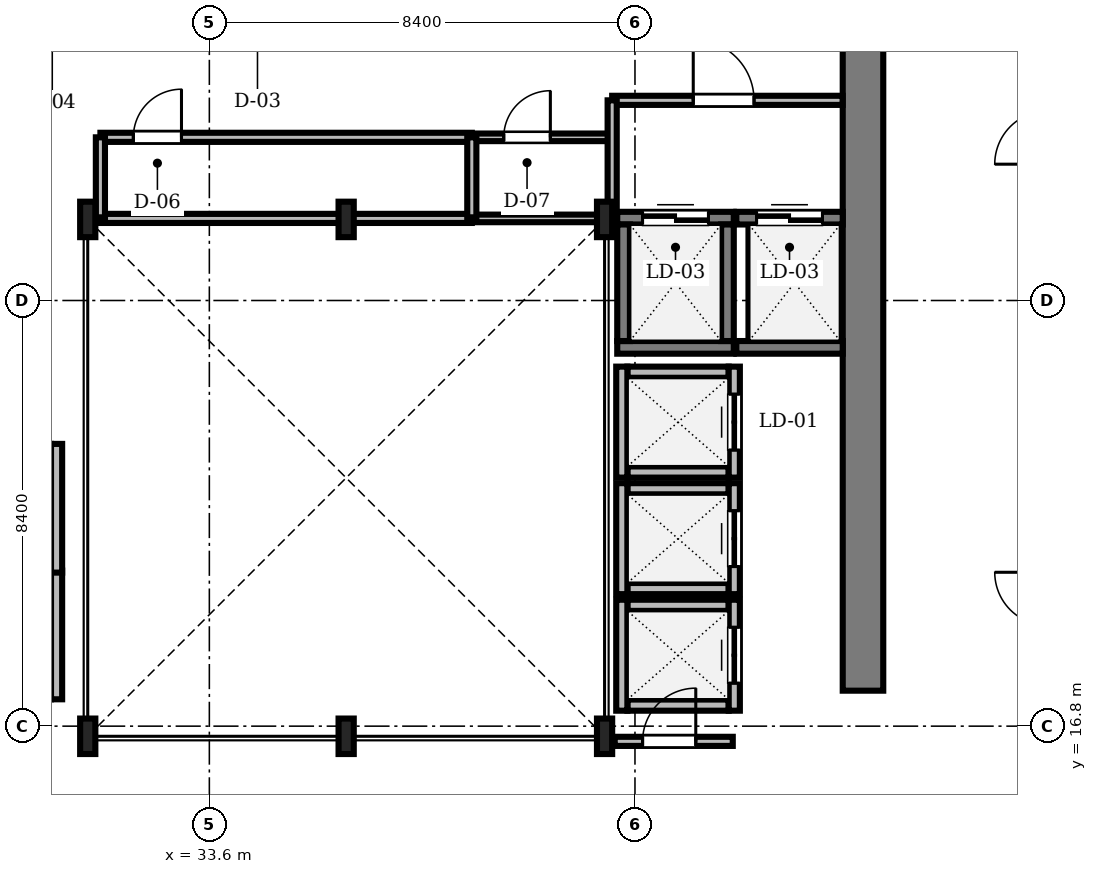
"""IFC4 building model, lengths in metres.
Left out: names, types, materials, properties, quantities, classifications, styles, units other than length and angle.
Written with IfcOpenShell. Run it as: python <this file> out.ifc"""

import sys

from ifc_helpers import new_model, si_unit, direction, frame, frame_2d, origin, origin_2d, place, context, subcontext, project, spatial, rectangle, i_section, extrude, source, transform, mapped, element, fill, save


model = new_model("IFC4")
c1 = context("Model", 3, precision=1e-05, world=origin(), true_north=direction((0.0, 1.0)))
c2 = subcontext(c1, "Body", "Model", "MODEL_VIEW")
j1 = project(units=[si_unit("LENGTHUNIT", "METRE"), si_unit("PLANEANGLEUNIT", "RADIAN")], contexts=[c1])
p1 = place(None, origin())
s1 = spatial("IfcSite", under=j1, at=p1, CompositionType="ELEMENT")
p2 = place(p1, origin())
s2 = spatial("IfcBuilding", under=s1, at=p2, CompositionType="ELEMENT")
p3 = place(p2, frame((0.0, 0.0, 188.55)))
s3 = spatial("IfcBuildingStorey", under=s2, at=p3, CompositionType="ELEMENT", Elevation=188.55)
m1 = source(origin(), c2, "Body", "SweptSolid", [
    extrude(rectangle(XDim=13.15, YDim=0.8, at=frame_2d((6.575, 0.0))), origin(), (0.0, 0.0, 1.0), 3.53),
])
p4 = place(p3, frame((46.5, 17.5, 0.0), z_axis=(0.0, 0.0, 1.0), x_axis=(0.0, 1.0, 0.0)))
e1 = element("IfcWall", 1, at=p4, inside=s3, PredefinedType="SHEAR", context=c2, shape_type="MappedRepresentation", body=[
    mapped(m1, transform((0.0, 0.0, 0.0), scale=1.0)),
])
m2 = source(origin(), c2, "Body", "SweptSolid", [
    extrude(i_section(OverallWidth=0.3, OverallDepth=0.7, WebThickness=0.017, FlangeThickness=0.032, FilletRadius=0.027, at=origin_2d()), origin(), (0.0, 0.0, 1.0), 3.53),
])
for number, where, z_axis, x_axis in (
    (2, (31.2, 16.6, 0.0), (0.0, 0.0, 1.0), (1.0, 0.0, 0.0)),
    (3, (36.3, 16.6, 0.0), (0.0, 0.0, 1.0), (1.0, 0.0, 0.0)),
    (4, (41.4, 16.6, 0.0), (0.0, 0.0, 1.0), (1.0, 0.0, 0.0)),
    (5, (41.4, 26.8, 0.0), (0.0, 0.0, 1.0), (1.0, 0.0, 0.0)),
    (6, (36.3, 26.8, 0.0), (0.0, 0.0, 1.0), (1.0, 0.0, 0.0)),
    (7, (31.2, 26.8, 0.0), (0.0, 0.0, 1.0), (1.0, 0.0, 0.0)),
):
    element("IfcColumn", number, at=place(p3, frame(where, z_axis=z_axis, x_axis=x_axis)), inside=s3, PredefinedType="COLUMN", context=c2, shape_type="MappedRepresentation", body=[
        mapped(m2, transform((0.0, 0.0, 0.0), scale=1.0)),
    ])
m3 = source(origin(), c2, "Body", "SweptSolid", [
    extrude(rectangle(XDim=2.0, YDim=0.22, at=frame_2d((1.0, 0.0))), origin(), (0.0, 0.0, 1.0), 3.53),
])
for number, where, z_axis, x_axis in (
    (8, (41.85, 21.815, 0.0), (0.0, 0.0, 1.0), (1.0, 0.0, 0.0)),
    (9, (41.85, 23.785, 0.0), (0.0, 0.0, 1.0), (1.0, 0.0, 0.0)),
):
    element("IfcWall", number, at=place(p3, frame(where, z_axis=z_axis, x_axis=x_axis)), inside=s3, PredefinedType="SOLIDWALL", context=c2, shape_type="MappedRepresentation", body=[
        mapped(m3, transform((0.0, 0.0, 0.0), scale=1.0)),
    ])
m4 = source(origin(), c2, "Body", "SweptSolid", [
    extrude(rectangle(XDim=2.19, YDim=0.22, at=frame_2d((1.095, 0.0))), origin(), (0.0, 0.0, 1.0), 3.53),
])
p5 = place(p3, frame((41.74, 21.705, 0.0), z_axis=(0.0, 0.0, 1.0), x_axis=(0.0, 1.0, 0.0)))
e10 = element("IfcWall", 10, at=p5, inside=s3, PredefinedType="SOLIDWALL", context=c2, shape_type="MappedRepresentation", body=[
    mapped(m4, transform((0.0, 0.0, 0.0), scale=1.0)),
])
p6 = place(p3, frame((43.96, 21.705, 0.0), z_axis=(0.0, 0.0, 1.0), x_axis=(0.0, 1.0, 0.0)))
e11 = element("IfcWall", 11, at=p6, inside=s3, PredefinedType="SOLIDWALL", context=c2, shape_type="MappedRepresentation", body=[
    mapped(m4, transform((0.0, 0.0, 0.0), scale=1.0)),
])
m5 = source(origin(), c2, "Body", "SweptSolid", [
    extrude(rectangle(XDim=1.1, YDim=2.2, at=frame_2d((0.55, 1.1))), frame((0.0, 0.12, 0.0), z_axis=(0.0, -1.0, 0.0), x_axis=(1.0, 0.0, 0.0)), (0.0, 0.0, 1.0), 0.24),
])
p7 = place(p6, frame((0.545, 0.0, 0.0)))
e12 = element("IfcOpeningElement", 12, at=p7, cuts=e11, PredefinedType="OPENING", context=c2, shape_type="MappedRepresentation", body=[
    mapped(m5, transform((0.0, 0.0, 0.0), scale=1.0)),
])
for number, where, z_axis, x_axis in (
    (13, (41.85, 19.515, 0.0), (0.0, 0.0, 1.0), (1.0, 0.0, 0.0)),
    (14, (41.85, 21.485, 0.0), (0.0, 0.0, 1.0), (1.0, 0.0, 0.0)),
):
    element("IfcWall", number, at=place(p3, frame(where, z_axis=z_axis, x_axis=x_axis)), inside=s3, PredefinedType="SOLIDWALL", context=c2, shape_type="MappedRepresentation", body=[
        mapped(m3, transform((0.0, 0.0, 0.0), scale=1.0)),
    ])
p8 = place(p3, frame((41.74, 19.405, 0.0), z_axis=(0.0, 0.0, 1.0), x_axis=(0.0, 1.0, 0.0)))
e15 = element("IfcWall", 15, at=p8, inside=s3, PredefinedType="SOLIDWALL", context=c2, shape_type="MappedRepresentation", body=[
    mapped(m4, transform((0.0, 0.0, 0.0), scale=1.0)),
])
p9 = place(p3, frame((43.96, 19.405, 0.0), z_axis=(0.0, 0.0, 1.0), x_axis=(0.0, 1.0, 0.0)))
e16 = element("IfcWall", 16, at=p9, inside=s3, PredefinedType="SOLIDWALL", context=c2, shape_type="MappedRepresentation", body=[
    mapped(m4, transform((0.0, 0.0, 0.0), scale=1.0)),
])
p10 = place(p9, frame((0.545, 0.0, 0.0)))
e17 = element("IfcOpeningElement", 17, at=p10, cuts=e16, PredefinedType="OPENING", context=c2, shape_type="MappedRepresentation", body=[
    mapped(m5, transform((0.0, 0.0, 0.0), scale=1.0)),
])
for number, where, z_axis, x_axis in (
    (18, (41.85, 17.215, 0.0), (0.0, 0.0, 1.0), (1.0, 0.0, 0.0)),
    (19, (41.85, 19.185, 0.0), (0.0, 0.0, 1.0), (1.0, 0.0, 0.0)),
):
    element("IfcWall", number, at=place(p3, frame(where, z_axis=z_axis, x_axis=x_axis)), inside=s3, PredefinedType="SOLIDWALL", context=c2, shape_type="MappedRepresentation", body=[
        mapped(m3, transform((0.0, 0.0, 0.0), scale=1.0)),
    ])
p11 = place(p3, frame((41.74, 17.105, 0.0), z_axis=(0.0, 0.0, 1.0), x_axis=(0.0, 1.0, 0.0)))
e20 = element("IfcWall", 20, at=p11, inside=s3, PredefinedType="SOLIDWALL", context=c2, shape_type="MappedRepresentation", body=[
    mapped(m4, transform((0.0, 0.0, 0.0), scale=1.0)),
])
p12 = place(p3, frame((43.96, 17.105, 0.0), z_axis=(0.0, 0.0, 1.0), x_axis=(0.0, 1.0, 0.0)))
e21 = element("IfcWall", 21, at=p12, inside=s3, PredefinedType="SOLIDWALL", context=c2, shape_type="MappedRepresentation", body=[
    mapped(m4, transform((0.0, 0.0, 0.0), scale=1.0)),
])
p13 = place(p12, frame((0.545, 0.0, 0.0)))
e22 = element("IfcOpeningElement", 22, at=p13, cuts=e21, PredefinedType="OPENING", context=c2, shape_type="MappedRepresentation", body=[
    mapped(m5, transform((0.0, 0.0, 0.0), scale=1.0)),
])
m6 = source(origin(), c2, "Body", "SweptSolid", [
    extrude(rectangle(XDim=2.54, YDim=0.22, at=frame_2d((1.27, 0.0))), origin(), (0.0, 0.0, 1.0), 3.53),
])
for number, where, z_axis, x_axis in (
    (23, (30.585, 17.33, 0.0), (0.0, 0.0, 1.0), (0.0, 1.0, 0.0)),
    (24, (30.585, 19.83, 0.0), (0.0, 0.0, 1.0), (0.0, 1.0, 0.0)),
):
    element("IfcWall", number, at=place(p3, frame(where, z_axis=z_axis, x_axis=x_axis)), inside=s3, PredefinedType="SOLIDWALL", context=c2, shape_type="MappedRepresentation", body=[
        mapped(m6, transform((0.0, 0.0, 0.0), scale=1.0)),
    ])
m7 = source(origin(), c2, "Body", "SweptSolid", [
    extrude(rectangle(XDim=2.3, YDim=0.25, at=frame_2d((1.15, 0.0))), origin(), (0.0, 0.0, 1.0), 3.53),
])
p14 = place(p3, frame((41.65, 24.275, 0.0), z_axis=(0.0, 0.0, 1.0), x_axis=(1.0, 0.0, 0.0)))
e25 = element("IfcWall", 25, at=p14, inside=s3, PredefinedType="SOLIDWALL", context=c2, shape_type="MappedRepresentation", body=[
    mapped(m7, transform((0.0, 0.0, 0.0), scale=1.0)),
])
p15 = place(p3, frame((41.65, 26.825, 0.0), z_axis=(0.0, 0.0, 1.0), x_axis=(1.0, 0.0, 0.0)))
e26 = element("IfcWall", 26, at=p15, inside=s3, PredefinedType="SOLIDWALL", context=c2, shape_type="MappedRepresentation", body=[
    mapped(m7, transform((0.0, 0.0, 0.0), scale=1.0)),
])
m8 = source(origin(), c2, "Body", "SweptSolid", [
    extrude(rectangle(XDim=1.3, YDim=2.3, at=frame_2d((0.65, 1.15))), frame((0.0, 0.135, 0.0), z_axis=(0.0, -1.0, 0.0), x_axis=(1.0, 0.0, 0.0)), (0.0, 0.0, 1.0), 0.27),
])
p16 = place(p15, frame((0.5, 0.0, 0.0)))
e27 = element("IfcOpeningElement", 27, at=p16, cuts=e26, PredefinedType="OPENING", context=c2, shape_type="MappedRepresentation", body=[
    mapped(m8, transform((0.0, 0.0, 0.0), scale=1.0)),
])
for number, where, z_axis, x_axis in (
    (28, (41.775, 24.4, 0.0), (0.0, 0.0, 1.0), (0.0, 1.0, 0.0)),
    (29, (43.825, 24.4, 0.0), (0.0, 0.0, 1.0), (0.0, 1.0, 0.0)),
):
    element("IfcWall", number, at=place(p3, frame(where, z_axis=z_axis, x_axis=x_axis)), inside=s3, PredefinedType="SOLIDWALL", context=c2, shape_type="MappedRepresentation", body=[
        mapped(m7, transform((0.0, 0.0, 0.0), scale=1.0)),
    ])
m9 = source(origin(), c2, "Body", "SweptSolid", [
    extrude(rectangle(XDim=2.1, YDim=0.25, at=frame_2d((1.05, 0.0))), origin(), (0.0, 0.0, 1.0), 3.53),
])
p17 = place(p3, frame((44.0, 24.275, 0.0), z_axis=(0.0, 0.0, 1.0), x_axis=(1.0, 0.0, 0.0)))
e30 = element("IfcWall", 30, at=p17, inside=s3, PredefinedType="SOLIDWALL", context=c2, shape_type="MappedRepresentation", body=[
    mapped(m9, transform((0.0, 0.0, 0.0), scale=1.0)),
])
p18 = place(p3, frame((44.0, 26.825, 0.0), z_axis=(0.0, 0.0, 1.0), x_axis=(1.0, 0.0, 0.0)))
e31 = element("IfcWall", 31, at=p18, inside=s3, PredefinedType="SOLIDWALL", context=c2, shape_type="MappedRepresentation", body=[
    mapped(m9, transform((0.0, 0.0, 0.0), scale=1.0)),
])
p19 = place(p18, frame((0.4, 0.0, 0.0)))
e32 = element("IfcOpeningElement", 32, at=p19, cuts=e31, PredefinedType="OPENING", context=c2, shape_type="MappedRepresentation", body=[
    mapped(m8, transform((0.0, 0.0, 0.0), scale=1.0)),
])
m10 = source(origin(), c2, "Body", "SweptSolid", [
    extrude(rectangle(XDim=7.33, YDim=0.18, at=frame_2d((3.665, 0.0))), origin(), (0.0, 0.0, 1.0), 3.162),
])
p20 = place(p3, frame((31.45, 28.42, 0.0), z_axis=(0.0, 0.0, 1.0), x_axis=(1.0, 0.0, 0.0)))
e33 = element("IfcWall", 33, at=p20, inside=s3, PredefinedType="PARTITIONING", context=c2, shape_type="MappedRepresentation", body=[
    mapped(m10, transform((0.0, 0.0, 0.0), scale=1.0)),
])
m11 = source(origin(), c2, "Body", "SweptSolid", [
    extrude(rectangle(XDim=0.95, YDim=2.15, at=frame_2d((0.475, 1.075))), frame((0.0, 0.1, 0.0), z_axis=(0.0, -1.0, 0.0), x_axis=(1.0, 0.0, 0.0)), (0.0, 0.0, 1.0), 0.2),
])
p21 = place(p20, frame((0.65, 0.0, 0.0)))
e34 = element("IfcOpeningElement", 34, at=p21, cuts=e33, PredefinedType="OPENING", context=c2, shape_type="MappedRepresentation", body=[
    mapped(m11, transform((0.0, 0.0, 0.0), scale=1.0)),
])
m12 = source(origin(), c2, "Body", "SweptSolid", [
    extrude(rectangle(XDim=4.548, YDim=0.18, at=frame_2d((2.274, 0.0))), origin(), (0.0, 0.0, 1.0), 3.162),
])
p22 = place(p3, frame((41.55, 29.15, 0.0), z_axis=(0.0, 0.0, 1.0), x_axis=(1.0, 0.0, 0.0)))
e35 = element("IfcWall", 35, at=p22, inside=s3, PredefinedType="PARTITIONING", context=c2, shape_type="MappedRepresentation", body=[
    mapped(m12, transform((0.0, 0.0, 0.0), scale=1.0)),
])
m13 = source(origin(), c2, "Body", "SweptSolid", [
    extrude(rectangle(XDim=1.2, YDim=2.2, at=frame_2d((0.6, 1.1))), frame((0.0, 0.1, 0.0), z_axis=(0.0, -1.0, 0.0), x_axis=(1.0, 0.0, 0.0)), (0.0, 0.0, 1.0), 0.2),
])
p23 = place(p22, frame((1.6, 0.0, 0.0)))
e36 = element("IfcOpeningElement", 36, at=p23, cuts=e35, PredefinedType="OPENING", context=c2, shape_type="MappedRepresentation", body=[
    mapped(m13, transform((0.0, 0.0, 0.0), scale=1.0)),
])
m14 = source(origin(), c2, "Body", "SweptSolid", [
    extrude(rectangle(XDim=2.74, YDim=0.15, at=frame_2d((1.37, 0.0))), origin(), (0.0, 0.0, 1.0), 3.53),
])
p24 = place(p3, frame((38.78, 28.42, 0.0), z_axis=(0.0, 0.0, 1.0), x_axis=(1.0, 0.0, 0.0)))
e37 = element("IfcWall", 37, at=p24, inside=s3, PredefinedType="PARTITIONING", context=c2, shape_type="MappedRepresentation", body=[
    mapped(m14, transform((0.0, 0.0, 0.0), scale=1.0)),
])
m15 = source(origin(), c2, "Body", "SweptSolid", [
    extrude(rectangle(XDim=0.92, YDim=2.1, at=frame_2d((0.46, 1.05))), frame((0.0, 0.085, 0.0), z_axis=(0.0, -1.0, 0.0), x_axis=(1.0, 0.0, 0.0)), (0.0, 0.0, 1.0), 0.17),
])
p25 = place(p24, frame((0.63, 0.0, 0.0)))
e38 = element("IfcOpeningElement", 38, at=p25, cuts=e37, PredefinedType="OPENING", context=c2, shape_type="MappedRepresentation", body=[
    mapped(m15, transform((0.0, 0.0, 0.0), scale=1.0)),
])
m16 = source(origin(), c2, "Body", "SweptSolid", [
    extrude(rectangle(XDim=2.33, YDim=0.18, at=frame_2d((1.165, 0.0))), origin(), (0.0, 0.0, 1.0), 2.972),
])
p26 = place(p3, frame((41.6, 16.5, 0.0), z_axis=(0.0, 0.0, 1.0), x_axis=(1.0, 0.0, 0.0)))
e39 = element("IfcWall", 39, at=p26, inside=s3, PredefinedType="PARTITIONING", context=c2, shape_type="MappedRepresentation", body=[
    mapped(m16, transform((0.0, 0.0, 0.0), scale=1.0)),
])
m17 = source(origin(), c2, "Body", "SweptSolid", [
    extrude(rectangle(XDim=1.05, YDim=2.2, at=frame_2d((0.525, 1.1))), frame((0.0, 0.1, 0.0), z_axis=(0.0, -1.0, 0.0), x_axis=(1.0, 0.0, 0.0)), (0.0, 0.0, 1.0), 0.2),
])
p27 = place(p26, frame((0.55, 0.0, 0.0)))
e40 = element("IfcOpeningElement", 40, at=p27, cuts=e39, PredefinedType="OPENING", context=c2, shape_type="MappedRepresentation", body=[
    mapped(m17, transform((0.0, 0.0, 0.0), scale=1.0)),
])
m18 = source(origin(), c2, "Body", "SweptSolid", [
    extrude(rectangle(XDim=7.33, YDim=0.18, at=frame_2d((3.665, 0.0))), origin(), (0.0, 0.0, 1.0), 3.072),
])
p28 = place(p3, frame((31.45, 26.82, 0.0), z_axis=(0.0, 0.0, 1.0), x_axis=(1.0, 0.0, 0.0)))
e41 = element("IfcWall", 41, at=p28, inside=s3, PredefinedType="PARTITIONING", context=c2, shape_type="MappedRepresentation", body=[
    mapped(m18, transform((0.0, 0.0, 0.0), scale=1.0)),
])
m19 = source(origin(), c2, "Body", "SweptSolid", [
    extrude(rectangle(XDim=2.74, YDim=0.15, at=frame_2d((1.37, 0.0))), origin(), (0.0, 0.0, 1.0), 2.972),
])
p29 = place(p3, frame((38.78, 26.82, 0.0), z_axis=(0.0, 0.0, 1.0), x_axis=(1.0, 0.0, 0.0)))
e42 = element("IfcWall", 42, at=p29, inside=s3, PredefinedType="PARTITIONING", context=c2, shape_type="MappedRepresentation", body=[
    mapped(m19, transform((0.0, 0.0, 0.0), scale=1.0)),
])
m20 = source(origin(), c2, "Body", "SweptSolid", [
    extrude(rectangle(XDim=2.35, YDim=0.18, at=frame_2d((1.175, 0.0))), origin(), (0.0, 0.0, 1.0), 2.972),
])
p30 = place(p3, frame((41.55, 26.8, 0.0), z_axis=(0.0, 0.0, 1.0), x_axis=(0.0, 1.0, 0.0)))
e43 = element("IfcWall", 43, at=p30, inside=s3, PredefinedType="PARTITIONING", context=c2, shape_type="MappedRepresentation", body=[
    mapped(m20, transform((0.0, 0.0, 0.0), scale=1.0)),
])
m21 = source(origin(), c2, "Body", "SweptSolid", [
    extrude(rectangle(XDim=1.6, YDim=0.18, at=frame_2d((0.8, 0.0))), origin(), (0.0, 0.0, 1.0), 3.072),
])
for number, where, z_axis, x_axis in (
    (44, (31.45, 26.82, 0.0), (0.0, 0.0, 1.0), (0.0, 1.0, 0.0)),
    (45, (38.78, 26.82, 0.0), (0.0, 0.0, 1.0), (0.0, 1.0, 0.0)),
):
    element("IfcWall", number, at=place(p3, frame(where, z_axis=z_axis, x_axis=x_axis)), inside=s3, PredefinedType="PARTITIONING", context=c2, shape_type="MappedRepresentation", body=[
        mapped(m21, transform((0.0, 0.0, 0.0), scale=1.0)),
    ])
m22 = source(origin(), c2, "Body", "SweptSolid", [
    extrude(rectangle(XDim=1.1, YDim=2.2, at=frame_2d((0.55, 1.1))), frame((0.0, 0.025, 0.0), z_axis=(0.0, -1.0, 0.0), x_axis=(1.0, 0.0, 0.0)), (0.0, 0.0, 1.0), 0.05),
])
p31 = place(p7, origin())
e46 = element("IfcDoor", 46, at=p31, inside=s3, OperationType="DOUBLE_DOOR_SLIDING", PredefinedType="DOOR", context=c2, shape_type="MappedRepresentation", body=[
    mapped(m22, transform((0.0, 0.0, 0.0), scale=1.0)),
])
fill(e12, e46)
p32 = place(p10, origin())
e47 = element("IfcDoor", 47, at=p32, inside=s3, OperationType="DOUBLE_DOOR_SLIDING", PredefinedType="DOOR", context=c2, shape_type="MappedRepresentation", body=[
    mapped(m22, transform((0.0, 0.0, 0.0), scale=1.0)),
])
fill(e17, e47)
p33 = place(p13, origin())
e48 = element("IfcDoor", 48, at=p33, inside=s3, OperationType="DOUBLE_DOOR_SLIDING", PredefinedType="DOOR", context=c2, shape_type="MappedRepresentation", body=[
    mapped(m22, transform((0.0, 0.0, 0.0), scale=1.0)),
])
fill(e22, e48)
m23 = source(origin(), c2, "Body", "SweptSolid", [
    extrude(rectangle(XDim=1.3, YDim=2.3, at=frame_2d((0.65, 1.15))), frame((0.0, 0.025, 0.0), z_axis=(0.0, -1.0, 0.0), x_axis=(1.0, 0.0, 0.0)), (0.0, 0.0, 1.0), 0.05),
])
p34 = place(p16, origin())
e49 = element("IfcDoor", 49, at=p34, inside=s3, OperationType="DOUBLE_DOOR_SLIDING", PredefinedType="DOOR", context=c2, shape_type="MappedRepresentation", body=[
    mapped(m23, transform((0.0, 0.0, 0.0), scale=1.0)),
])
fill(e27, e49)
p35 = place(p19, origin())
e50 = element("IfcDoor", 50, at=p35, inside=s3, OperationType="DOUBLE_DOOR_SLIDING", PredefinedType="DOOR", context=c2, shape_type="MappedRepresentation", body=[
    mapped(m23, transform((0.0, 0.0, 0.0), scale=1.0)),
])
fill(e32, e50)
m24 = source(origin(), c2, "Body", "SweptSolid", [
    extrude(rectangle(XDim=0.95, YDim=2.15, at=frame_2d((0.475, 1.075))), frame((0.0, 0.025, 0.0), z_axis=(0.0, -1.0, 0.0), x_axis=(1.0, 0.0, 0.0)), (0.0, 0.0, 1.0), 0.05),
])
p36 = place(p21, origin())
e51 = element("IfcDoor", 51, at=p36, inside=s3, OperationType="SINGLE_SWING_RIGHT", PredefinedType="DOOR", context=c2, shape_type="MappedRepresentation", body=[
    mapped(m24, transform((0.0, 0.0, 0.0), scale=1.0)),
])
fill(e34, e51)
m25 = source(origin(), c2, "Body", "SweptSolid", [
    extrude(rectangle(XDim=1.2, YDim=2.2, at=frame_2d((0.6, 1.1))), frame((0.0, 0.025, 0.0), z_axis=(0.0, -1.0, 0.0), x_axis=(1.0, 0.0, 0.0)), (0.0, 0.0, 1.0), 0.05),
])
p37 = place(p23, origin())
e52 = element("IfcDoor", 52, at=p37, inside=s3, OperationType="SINGLE_SWING_LEFT", PredefinedType="DOOR", context=c2, shape_type="MappedRepresentation", body=[
    mapped(m25, transform((0.0, 0.0, 0.0), scale=1.0)),
])
fill(e36, e52)
m26 = source(origin(), c2, "Body", "SweptSolid", [
    extrude(rectangle(XDim=0.92, YDim=2.1, at=frame_2d((0.46, 1.05))), frame((0.0, 0.025, 0.0), z_axis=(0.0, -1.0, 0.0), x_axis=(1.0, 0.0, 0.0)), (0.0, 0.0, 1.0), 0.05),
])
p38 = place(p25, origin())
e53 = element("IfcDoor", 53, at=p38, inside=s3, OperationType="SINGLE_SWING_RIGHT", PredefinedType="DOOR", context=c2, shape_type="MappedRepresentation", body=[
    mapped(m26, transform((0.0, 0.0, 0.0), scale=1.0)),
])
fill(e38, e53)
m27 = source(origin(), c2, "Body", "SweptSolid", [
    extrude(rectangle(XDim=1.05, YDim=2.2, at=frame_2d((0.525, 1.1))), frame((0.0, 0.025, 0.0), z_axis=(0.0, -1.0, 0.0), x_axis=(1.0, 0.0, 0.0)), (0.0, 0.0, 1.0), 0.05),
])
p39 = place(p27, origin())
e54 = element("IfcDoor", 54, at=p39, inside=s3, OperationType="SINGLE_SWING_RIGHT", PredefinedType="DOOR", context=c2, shape_type="MappedRepresentation", body=[
    mapped(m27, transform((0.0, 0.0, 0.0), scale=1.0)),
])
fill(e40, e54)
save(model, sys.argv[1])
